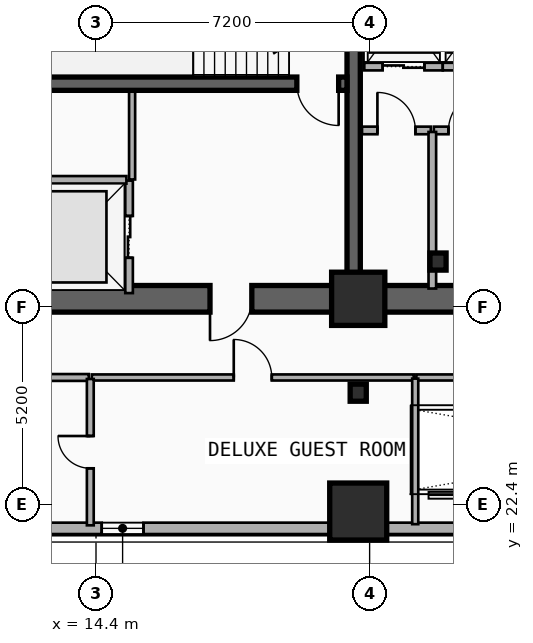
"""IFC4 building model, lengths in metres.
Left out: names, types, materials, properties, quantities, classifications, styles, units other than length and angle.
Written with IfcOpenShell. Run it as: python <this file> out.ifc"""

import sys

from ifc_helpers import new_model, si_unit, direction, frame, frame_2d, origin, origin_2d, place, context, subcontext, project, spatial, rectangle, i_section, extrude, element, fill, save


model = new_model("IFC4")
c1 = context("Model", 3, precision=1e-05, world=origin(), true_north=direction((0.0, 1.0)))
c2 = subcontext(c1, "Body", "Model", "MODEL_VIEW")
j1 = project(units=[si_unit("LENGTHUNIT", "METRE"), si_unit("PLANEANGLEUNIT", "RADIAN")], contexts=[c1])
p1 = place(None, origin())
s1 = spatial("IfcSite", under=j1, at=p1, CompositionType="ELEMENT")
p2 = place(p1, origin())
s2 = spatial("IfcBuilding", under=s1, at=p2, CompositionType="ELEMENT")
p3 = place(p2, frame((0.0, 0.0, 43.0)))
s3 = spatial("IfcBuildingStorey", under=s2, at=p3, CompositionType="ELEMENT", Elevation=43.0)
p4 = place(p3, frame((21.18, 27.82, 0.0), z_axis=(0.0, 0.0, 1.0), x_axis=(-1.0, 0.0, 0.0)))
e1 = element("IfcWall", 1, at=p4, inside=s3, PredefinedType="SHEAR", context=c2, shape_type="SweptSolid", body=[
    extrude(rectangle(XDim=9.03, YDim=0.7, at=frame_2d((4.515, 0.0))), origin(), (0.0, 0.0, 1.0), 3.5),
])
p5 = place(p4, frame((2.68, 0.0, 0.0)))
e2 = element("IfcOpeningElement", 2, at=p5, cuts=e1, PredefinedType="OPENING", context=c2, shape_type="SweptSolid", body=[
    extrude(rectangle(XDim=1.1, YDim=2.15, at=frame_2d((0.55, 1.075))), frame((0.0, 0.36, 0.0), z_axis=(0.0, -1.0, 0.0), x_axis=(1.0, 0.0, 0.0)), (0.0, 0.0, 1.0), 0.72),
])
p6 = place(p3, frame((33.15, 27.82, 0.0), z_axis=(0.0, 0.0, 1.0), x_axis=(-1.0, 0.0, 0.0)))
e3 = element("IfcWall", 3, at=p6, inside=s3, PredefinedType="SHEAR", context=c2, shape_type="SweptSolid", body=[
    extrude(rectangle(XDim=11.97, YDim=0.7, at=frame_2d((5.985, 0.0))), origin(), (0.0, 0.0, 1.0), 3.5),
])
p7 = place(p6, frame((6.1, 0.0, 0.0)))
e4 = element("IfcOpeningElement", 4, at=p7, cuts=e3, PredefinedType="OPENING", context=c2, shape_type="SweptSolid", body=[
    extrude(rectangle(XDim=1.6, YDim=2.2, at=frame_2d((0.8, 1.1))), frame((0.0, 0.36, 0.0), z_axis=(0.0, -1.0, 0.0), x_axis=(1.0, 0.0, 0.0)), (0.0, 0.0, 1.0), 0.72),
])
p8 = place(p3, frame((21.18, 28.17, 0.0), z_axis=(0.0, 0.0, 1.0), x_axis=(0.0, 1.0, 0.0)))
e5 = element("IfcWall", 5, at=p8, inside=s3, PredefinedType="SHEAR", context=c2, shape_type="SweptSolid", body=[
    extrude(rectangle(XDim=8.53, YDim=0.35, at=frame_2d((4.265, 0.0))), origin(), (0.0, 0.0, 1.0), 3.5),
])
p9 = place(p3, frame((21.005, 33.48, 0.0), z_axis=(0.0, 0.0, 1.0), x_axis=(-1.0, 0.0, 0.0)))
e6 = element("IfcWall", 6, at=p9, inside=s3, PredefinedType="SHEAR", context=c2, shape_type="SweptSolid", body=[
    extrude(rectangle(XDim=8.505, YDim=0.35, at=frame_2d((4.252, 0.0))), origin(), (0.0, 0.0, 1.0), 3.5),
])
p10 = place(p9, frame((0.22, 0.0, 0.0)))
e7 = element("IfcOpeningElement", 7, at=p10, cuts=e6, PredefinedType="OPENING", context=c2, shape_type="SweptSolid", body=[
    extrude(rectangle(XDim=1.1, YDim=2.15, at=frame_2d((0.55, 1.075))), frame((0.0, 0.185, 0.0), z_axis=(0.0, -1.0, 0.0), x_axis=(1.0, 0.0, 0.0)), (0.0, 0.0, 1.0), 0.37),
])
p11 = place(p3, frame((23.4, 28.8, 0.0), z_axis=(0.0, 0.0, 1.0), x_axis=(1.0, 0.0, 0.0)))
e8 = element("IfcColumn", 8, at=p11, inside=s3, PredefinedType="COLUMN", context=c2, shape_type="SweptSolid", body=[
    extrude(i_section(OverallWidth=0.424, OverallDepth=0.45, WebThickness=0.041, FlangeThickness=0.065, FilletRadius=0.015, at=origin_2d()), origin(), (0.0, 0.0, 1.0), 3.5),
])
p12 = place(p3, frame((21.3, 27.82, 0.0), z_axis=(0.0, 0.0, 1.0), x_axis=(1.0, 0.0, 0.0)))
e9 = element("IfcColumn", 9, at=p12, inside=s3, PredefinedType="COLUMN", context=c2, shape_type="SweptSolid", body=[
    extrude(rectangle(XDim=1.4, YDim=1.4, at=origin_2d()), origin(), (0.0, 0.0, 1.0), 3.5),
])
p13 = place(p3, frame((21.3, 25.35, 0.0), z_axis=(0.0, 0.0, 1.0), x_axis=(1.0, 0.0, 0.0)))
e10 = element("IfcColumn", 10, at=p13, inside=s3, PredefinedType="COLUMN", context=c2, shape_type="SweptSolid", body=[
    extrude(i_section(OverallWidth=0.424, OverallDepth=0.45, WebThickness=0.041, FlangeThickness=0.065, FilletRadius=0.015, at=origin_2d()), origin(), (0.0, 0.0, 1.0), 3.5),
])
p14 = place(p3, frame((21.3, 22.331, 0.0), z_axis=(0.0, -0.090241349316, 0.995919925935), x_axis=(1.0, 0.0, 0.0)))
e11 = element("IfcColumn", 11, at=p14, inside=s3, PredefinedType="COLUMN", context=c2, shape_type="SweptSolid", body=[
    extrude(rectangle(XDim=1.5, YDim=1.5, at=origin_2d()), origin(), (0.0, 0.0, 1.0), 3.514),
])
p15 = place(p3, frame((53.4, 21.78, 0.0), z_axis=(0.0, 0.0, 1.0), x_axis=(-1.0, 0.0, 0.0)))
e12 = element("IfcWall", 12, at=p15, inside=s3, PredefinedType="SOLIDWALL", context=c2, shape_type="SweptSolid", body=[
    extrude(rectangle(XDim=49.2, YDim=0.3, at=frame_2d((24.6, 0.0))), origin(), (0.0, 0.0, 1.0), 2.82),
])
p16 = place(p15, frame((46.859, 0.0, 0.65)))
e13 = element("IfcOpeningElement", 13, at=p16, cuts=e12, PredefinedType="OPENING", context=c2, shape_type="SweptSolid", body=[
    extrude(rectangle(XDim=1.8, YDim=1.8, at=frame_2d((0.9, 0.9))), frame((0.0, 0.16, 0.0), z_axis=(0.0, -1.0, 0.0), x_axis=(1.0, 0.0, 0.0)), (0.0, 0.0, 1.0), 0.32),
])
p17 = place(p15, frame((37.75, 0.0, 0.52)))
e14 = element("IfcOpeningElement", 14, at=p17, cuts=e12, PredefinedType="OPENING", context=c2, shape_type="SweptSolid", body=[
    extrude(rectangle(XDim=1.1, YDim=1.05, at=frame_2d((0.55, 0.525))), frame((0.0, 0.16, 0.0), z_axis=(0.0, -1.0, 0.0), x_axis=(1.0, 0.0, 0.0)), (0.0, 0.0, 1.0), 0.32),
])
p18 = place(p15, frame((14.658, 0.0, 0.34)))
e15 = element("IfcOpeningElement", 15, at=p18, cuts=e12, PredefinedType="OPENING", context=c2, shape_type="SweptSolid", body=[
    extrude(rectangle(XDim=1.2, YDim=1.5, at=frame_2d((0.6, 0.75))), frame((0.0, 0.16, 0.0), z_axis=(0.0, -1.0, 0.0), x_axis=(1.0, 0.0, 0.0)), (0.0, 0.0, 1.0), 0.32),
])
p19 = place(p15, frame((4.223, 0.0, 0.65)))
e16 = element("IfcOpeningElement", 16, at=p19, cuts=e12, PredefinedType="OPENING", context=c2, shape_type="SweptSolid", body=[
    extrude(rectangle(XDim=1.8, YDim=1.8, at=frame_2d((0.9, 0.9))), frame((0.0, 0.16, 0.0), z_axis=(0.0, -1.0, 0.0), x_axis=(1.0, 0.0, 0.0)), (0.0, 0.0, 1.0), 0.32),
])
p20 = place(p3, frame((15.27, 27.97, 0.0), z_axis=(0.0, 0.0, 1.0), x_axis=(0.0, 1.0, 0.0)))
e17 = element("IfcWall", 17, at=p20, inside=s3, PredefinedType="PARTITIONING", context=c2, shape_type="SweptSolid", body=[
    extrude(rectangle(XDim=2.96, YDim=0.2, at=frame_2d((1.48, 0.0))), origin(), (0.0, 0.0, 1.0), 2.212),
])
p21 = place(p20, frame((0.93, 0.0, 0.0)))
e18 = element("IfcOpeningElement", 18, at=p21, cuts=e17, PredefinedType="OPENING", context=c2, shape_type="SweptSolid", body=[
    extrude(rectangle(XDim=1.1, YDim=2.15, at=frame_2d((0.55, 1.075))), frame((0.0, 0.11, 0.0), z_axis=(0.0, -1.0, 0.0), x_axis=(1.0, 0.0, 0.0)), (0.0, 0.0, 1.0), 0.22),
])
p22 = place(p3, frame((12.45, 30.95, 0.0), z_axis=(0.0, 0.0, 1.0), x_axis=(1.0, 0.0, 0.0)))
e19 = element("IfcWall", 19, at=p22, inside=s3, PredefinedType="PARTITIONING", context=c2, shape_type="SweptSolid", body=[
    extrude(rectangle(XDim=2.75, YDim=0.2, at=frame_2d((1.375, 0.0))), origin(), (0.0, 0.0, 1.0), 2.212),
])
p23 = place(p3, frame((21.46, 33.93, 0.0), z_axis=(0.0, 0.0, 1.0), x_axis=(1.0, 0.0, 0.0)))
e20 = element("IfcWall", 20, at=p23, inside=s3, PredefinedType="PARTITIONING", context=c2, shape_type="SweptSolid", body=[
    extrude(rectangle(XDim=2.065, YDim=0.2, at=frame_2d((1.032, 0.0))), origin(), (0.0, 0.0, 1.0), 2.212),
])
p24 = place(p23, frame((0.482, 0.0, 0.0)))
e21 = element("IfcOpeningElement", 21, at=p24, cuts=e20, PredefinedType="OPENING", context=c2, shape_type="SweptSolid", body=[
    extrude(rectangle(XDim=1.1, YDim=2.15, at=frame_2d((0.55, 1.075))), frame((0.0, 0.11, 0.0), z_axis=(0.0, -1.0, 0.0), x_axis=(1.0, 0.0, 0.0)), (0.0, 0.0, 1.0), 0.22),
])
p25 = place(p3, frame((23.525, 33.93, 0.0), z_axis=(0.0, 0.0, 1.0), x_axis=(1.0, 0.0, 0.0)))
e22 = element("IfcWall", 22, at=p25, inside=s3, PredefinedType="PARTITIONING", context=c2, shape_type="SweptSolid", body=[
    extrude(rectangle(XDim=2.05, YDim=0.2, at=frame_2d((1.025, 0.0))), origin(), (0.0, 0.0, 1.0), 3.24),
])
p26 = place(p25, frame((0.475, 0.0, 0.0)))
e23 = element("IfcOpeningElement", 23, at=p26, cuts=e22, PredefinedType="OPENING", context=c2, shape_type="SweptSolid", body=[
    extrude(rectangle(XDim=1.1, YDim=2.15, at=frame_2d((0.55, 1.075))), frame((0.0, 0.11, 0.0), z_axis=(0.0, -1.0, 0.0), x_axis=(1.0, 0.0, 0.0)), (0.0, 0.0, 1.0), 0.22),
])
p27 = place(p3, frame((21.4, 32.25, 0.0), z_axis=(0.0, 0.0, 1.0), x_axis=(1.0, 0.0, 0.0)))
e24 = element("IfcWall", 24, at=p27, inside=s3, PredefinedType="PARTITIONING", context=c2, shape_type="SweptSolid", body=[
    extrude(rectangle(XDim=1.81, YDim=0.2, at=frame_2d((0.905, 0.0))), origin(), (0.0, 0.0, 1.0), 2.28),
])
p28 = place(p27, frame((0.405, 0.0, 0.0)))
e25 = element("IfcOpeningElement", 25, at=p28, cuts=e24, PredefinedType="OPENING", context=c2, shape_type="SweptSolid", body=[
    extrude(rectangle(XDim=1.0, YDim=2.15, at=frame_2d((0.5, 1.075))), frame((0.0, 0.11, 0.0), z_axis=(0.0, -1.0, 0.0), x_axis=(1.0, 0.0, 0.0)), (0.0, 0.0, 1.0), 0.22),
])
p29 = place(p3, frame((23.29, 32.25, 0.0), z_axis=(0.0, 0.0, 1.0), x_axis=(1.0, 0.0, 0.0)))
e26 = element("IfcWall", 26, at=p29, inside=s3, PredefinedType="PARTITIONING", context=c2, shape_type="SweptSolid", body=[
    extrude(rectangle(XDim=1.77, YDim=0.2, at=frame_2d((0.885, 0.0))), origin(), (0.0, 0.0, 1.0), 3.24),
])
p30 = place(p29, frame((0.385, 0.0, 0.0)))
e27 = element("IfcOpeningElement", 27, at=p30, cuts=e26, PredefinedType="OPENING", context=c2, shape_type="SweptSolid", body=[
    extrude(rectangle(XDim=1.0, YDim=2.15, at=frame_2d((0.5, 1.075))), frame((0.0, 0.11, 0.0), z_axis=(0.0, -1.0, 0.0), x_axis=(1.0, 0.0, 0.0)), (0.0, 0.0, 1.0), 0.22),
])
p31 = place(p3, frame((23.25, 28.09, 0.0), z_axis=(0.0, 0.0, 1.0), x_axis=(0.0, 1.0, 0.0)))
e28 = element("IfcWall", 28, at=p31, inside=s3, PredefinedType="PARTITIONING", context=c2, shape_type="SweptSolid", body=[
    extrude(rectangle(XDim=4.12, YDim=0.2, at=frame_2d((2.06, 0.0))), origin(), (0.0, 0.0, 1.0), 2.62),
])
p32 = place(p3, frame((14.29, 25.75, 0.0), z_axis=(0.0, 0.0, 1.0), x_axis=(1.0, 0.0, 0.0)))
e29 = element("IfcWall", 29, at=p32, inside=s3, PredefinedType="PARTITIONING", context=c2, shape_type="SweptSolid", body=[
    extrude(rectangle(XDim=8.47, YDim=0.16, at=frame_2d((4.235, 0.0))), origin(), (0.0, 0.0, 1.0), 2.28),
])
p33 = place(p32, frame((3.735, 0.0, 0.0)))
e30 = element("IfcOpeningElement", 30, at=p33, cuts=e29, PredefinedType="OPENING", context=c2, shape_type="SweptSolid", body=[
    extrude(rectangle(XDim=1.0, YDim=2.15, at=frame_2d((0.5, 1.075))), frame((0.0, 0.09, 0.0), z_axis=(0.0, -1.0, 0.0), x_axis=(1.0, 0.0, 0.0)), (0.0, 0.0, 1.0), 0.18),
])
p34 = place(p3, frame((12.24, 25.75, 0.0), z_axis=(0.0, 0.0, 1.0), x_axis=(1.0, 0.0, 0.0)))
e31 = element("IfcWall", 31, at=p34, inside=s3, PredefinedType="PLUMBINGWALL", context=c2, shape_type="SweptSolid", body=[
    extrude(rectangle(XDim=1.97, YDim=0.18, at=frame_2d((0.985, 0.0))), origin(), (0.0, 0.0, 1.0), 2.28),
])
p35 = place(p3, frame((14.25, 21.86, 0.0), z_axis=(0.0, 0.0, 1.0), x_axis=(0.0, 1.0, 0.0)))
e32 = element("IfcWall", 32, at=p35, inside=s3, PredefinedType="PLUMBINGWALL", context=c2, shape_type="SweptSolid", body=[
    extrude(rectangle(XDim=3.85, YDim=0.18, at=frame_2d((1.925, 0.0))), origin(), (0.0, 0.0, 1.0), 2.67),
])
p36 = place(p35, frame((1.5, 0.0, 0.0)))
e33 = element("IfcOpeningElement", 33, at=p36, cuts=e32, PredefinedType="OPENING", context=c2, shape_type="SweptSolid", body=[
    extrude(rectangle(XDim=0.85, YDim=2.1, at=frame_2d((0.425, 1.05))), frame((0.0, 0.1, 0.0), z_axis=(0.0, -1.0, 0.0), x_axis=(1.0, 0.0, 0.0)), (0.0, 0.0, 1.0), 0.2),
])
p37 = place(p3, frame((15.35, 30.96, 0.0), z_axis=(0.0, 0.0, 1.0), x_axis=(0.0, 1.0, 0.0)))
e34 = element("IfcWall", 34, at=p37, inside=s3, PredefinedType="PARTITIONING", context=c2, shape_type="SweptSolid", body=[
    extrude(rectangle(XDim=2.31, YDim=0.16, at=frame_2d((1.155, 0.0))), origin(), (0.0, 0.0, 1.0), 3.24),
])
p38 = place(p3, frame((22.83, 25.75, 0.0), z_axis=(0.0, 0.0, 1.0), x_axis=(1.0, 0.0, 0.0)))
e35 = element("IfcWall", 35, at=p38, inside=s3, PredefinedType="PARTITIONING", context=c2, shape_type="SweptSolid", body=[
    extrude(rectangle(XDim=11.94, YDim=0.16, at=frame_2d((5.97, 0.0))), origin(), (0.0, 0.0, 1.0), 3.24),
])
p39 = place(p3, frame((22.8, 21.89, 0.0), z_axis=(0.0, 0.0, 1.0), x_axis=(0.0, 1.0, 0.0)))
e36 = element("IfcWall", 36, at=p39, inside=s3, PredefinedType="PARTITIONING", context=c2, shape_type="SweptSolid", body=[
    extrude(rectangle(XDim=3.83, YDim=0.16, at=frame_2d((1.915, 0.0))), origin(), (0.0, 0.0, 1.0), 2.82),
])
p40 = place(p17, origin())
e37 = element("IfcWindow", 37, at=p40, inside=s3, PartitioningType="SINGLE_PANEL", PredefinedType="WINDOW", context=c2, shape_type="SweptSolid", body=[
    extrude(rectangle(XDim=1.1, YDim=1.05, at=frame_2d((0.55, 0.525))), frame((0.0, 0.03, 0.0), z_axis=(0.0, -1.0, 0.0), x_axis=(1.0, 0.0, 0.0)), (0.0, 0.0, 1.0), 0.06),
])
fill(e14, e37)
p41 = place(p21, origin())
e38 = element("IfcDoor", 38, at=p41, inside=s3, OperationType="DOUBLE_DOOR_SLIDING", PredefinedType="DOOR", context=c2, shape_type="SweptSolid", body=[
    extrude(rectangle(XDim=1.1, YDim=2.15, at=frame_2d((0.55, 1.075))), frame((0.0, 0.025, 0.0), z_axis=(0.0, -1.0, 0.0), x_axis=(1.0, 0.0, 0.0)), (0.0, 0.0, 1.0), 0.05),
])
fill(e18, e38)
p42 = place(p24, origin())
e39 = element("IfcDoor", 39, at=p42, inside=s3, OperationType="DOUBLE_DOOR_SLIDING", PredefinedType="DOOR", context=c2, shape_type="SweptSolid", body=[
    extrude(rectangle(XDim=1.1, YDim=2.15, at=frame_2d((0.55, 1.075))), frame((0.0, 0.025, 0.0), z_axis=(0.0, -1.0, 0.0), x_axis=(1.0, 0.0, 0.0)), (0.0, 0.0, 1.0), 0.05),
])
fill(e21, e39)
p43 = place(p10, origin())
e40 = element("IfcDoor", 40, at=p43, inside=s3, OperationType="SINGLE_SWING_LEFT", PredefinedType="DOOR", context=c2, shape_type="SweptSolid", body=[
    extrude(rectangle(XDim=1.1, YDim=2.15, at=frame_2d((0.55, 1.075))), frame((0.0, 0.025, 0.0), z_axis=(0.0, -1.0, 0.0), x_axis=(1.0, 0.0, 0.0)), (0.0, 0.0, 1.0), 0.05),
])
fill(e7, e40)
p44 = place(p5, origin())
e41 = element("IfcDoor", 41, at=p44, inside=s3, OperationType="SINGLE_SWING_RIGHT", PredefinedType="DOOR", context=c2, shape_type="SweptSolid", body=[
    extrude(rectangle(XDim=1.1, YDim=2.15, at=frame_2d((0.55, 1.075))), frame((0.0, 0.025, 0.0), z_axis=(0.0, -1.0, 0.0), x_axis=(1.0, 0.0, 0.0)), (0.0, 0.0, 1.0), 0.05),
])
fill(e2, e41)
p45 = place(p28, origin())
e42 = element("IfcDoor", 42, at=p45, inside=s3, OperationType="SINGLE_SWING_LEFT", PredefinedType="DOOR", context=c2, shape_type="SweptSolid", body=[
    extrude(rectangle(XDim=1.0, YDim=2.15, at=frame_2d((0.5, 1.075))), frame((0.0, 0.025, 0.0), z_axis=(0.0, -1.0, 0.0), x_axis=(1.0, 0.0, 0.0)), (0.0, 0.0, 1.0), 0.05),
])
fill(e25, e42)
p46 = place(p30, origin())
e43 = element("IfcDoor", 43, at=p46, inside=s3, OperationType="SINGLE_SWING_RIGHT", PredefinedType="DOOR", context=c2, shape_type="SweptSolid", body=[
    extrude(rectangle(XDim=1.0, YDim=2.15, at=frame_2d((0.5, 1.075))), frame((0.0, 0.025, 0.0), z_axis=(0.0, -1.0, 0.0), x_axis=(1.0, 0.0, 0.0)), (0.0, 0.0, 1.0), 0.05),
])
fill(e27, e43)
p47 = place(p33, origin())
e44 = element("IfcDoor", 44, at=p47, inside=s3, OperationType="SINGLE_SWING_LEFT", PredefinedType="DOOR", context=c2, shape_type="SweptSolid", body=[
    extrude(rectangle(XDim=1.0, YDim=2.15, at=frame_2d((0.5, 1.075))), frame((0.0, 0.025, 0.0), z_axis=(0.0, -1.0, 0.0), x_axis=(1.0, 0.0, 0.0)), (0.0, 0.0, 1.0), 0.05),
])
fill(e30, e44)
p48 = place(p36, origin())
e45 = element("IfcDoor", 45, at=p48, inside=s3, OperationType="SINGLE_SWING_RIGHT", PredefinedType="DOOR", context=c2, shape_type="SweptSolid", body=[
    extrude(rectangle(XDim=0.85, YDim=2.1, at=frame_2d((0.425, 1.05))), frame((0.0, 0.025, 0.0), z_axis=(0.0, -1.0, 0.0), x_axis=(1.0, 0.0, 0.0)), (0.0, 0.0, 1.0), 0.05),
])
fill(e33, e45)
save(model, sys.argv[1])
